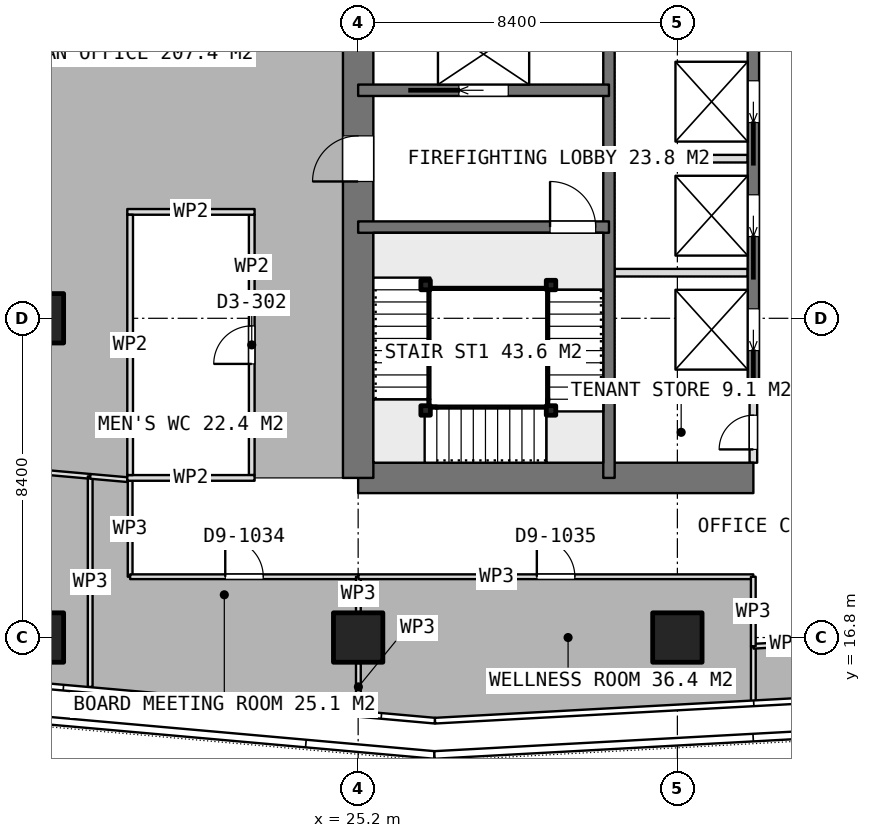
"""IFC4 building model, lengths in metres.
Left out: names, types, materials, properties, quantities, classifications, styles, units other than length and angle.
Written with IfcOpenShell. Run it as: python <this file> out.ifc"""

import sys

from ifc_helpers import new_model, si_unit, direction, frame, frame_2d, origin, origin_2d, place, context, subcontext, project, spatial, rectangle, extrude, element, fill, save


model = new_model("IFC4")
c1 = context("Model", 3, precision=1e-05, world=origin(), true_north=direction((0.0, 1.0)))
c2 = subcontext(c1, "Body", "Model", "MODEL_VIEW")
j1 = project(units=[si_unit("LENGTHUNIT", "METRE"), si_unit("PLANEANGLEUNIT", "RADIAN")], contexts=[c1])
p1 = place(None, origin())
s1 = spatial("IfcSite", under=j1, at=p1, CompositionType="ELEMENT")
p2 = place(p1, origin())
s2 = spatial("IfcBuilding", under=s1, at=p2, CompositionType="ELEMENT")
p3 = place(p2, frame((0.0, 0.0, 280.1)))
s3 = spatial("IfcBuildingStorey", under=s2, at=p3, CompositionType="ELEMENT", Elevation=280.1)
p4 = place(p3, frame((25.2, 21.0, 0.0), z_axis=(0.0, 0.0, 1.0), x_axis=(1.0, 0.0, 0.0)))
e1 = element("IfcWall", 1, at=p4, inside=s3, PredefinedType="SHEAR", context=c2, shape_type="SweptSolid", body=[
    extrude(rectangle(XDim=10.4, YDim=0.8, at=frame_2d((5.2, 0.0))), origin(), (0.0, 0.0, 1.0), 3.75),
])
p5 = place(p3, frame((25.2, 21.0, 0.0), z_axis=(0.0, 0.0, 1.0), x_axis=(0.0, 1.0, 0.0)))
e2 = element("IfcWall", 2, at=p5, inside=s3, PredefinedType="SHEAR", context=c2, shape_type="SweptSolid", body=[
    extrude(rectangle(XDim=25.2, YDim=0.8, at=frame_2d((12.6, 0.0))), origin(), (0.0, 0.0, 1.0), 3.75),
])
p6 = place(p5, frame((7.8, 0.0, 0.0)))
e3 = element("IfcOpeningElement", 3, at=p6, cuts=e2, PredefinedType="OPENING", context=c2, shape_type="SweptSolid", body=[
    extrude(rectangle(XDim=1.2, YDim=2.1, at=frame_2d((0.6, 1.05))), frame((0.0, 0.41, 0.0), z_axis=(0.0, -1.0, 0.0), x_axis=(1.0, 0.0, 0.0)), (0.0, 0.0, 1.0), 0.82),
])
p7 = place(p5, frame((14.25, 0.0, 0.0)))
e4 = element("IfcOpeningElement", 4, at=p7, cuts=e2, PredefinedType="OPENING", context=c2, shape_type="SweptSolid", body=[
    extrude(rectangle(XDim=0.9, YDim=2.1, at=frame_2d((0.45, 1.05))), frame((0.0, 0.41, 0.0), z_axis=(0.0, -1.0, 0.0), x_axis=(1.0, 0.0, 0.0)), (0.0, 0.0, 1.0), 0.82),
])
p8 = place(p5, frame((16.85, 0.0, 0.0)))
e5 = element("IfcOpeningElement", 5, at=p8, cuts=e2, PredefinedType="OPENING", context=c2, shape_type="SweptSolid", body=[
    extrude(rectangle(XDim=0.9, YDim=2.1, at=frame_2d((0.45, 1.05))), frame((0.0, 0.41, 0.0), z_axis=(0.0, -1.0, 0.0), x_axis=(1.0, 0.0, 0.0)), (0.0, 0.0, 1.0), 0.82),
])
p9 = place(p5, frame((18.95, 0.0, 0.0)))
e6 = element("IfcOpeningElement", 6, at=p9, cuts=e2, PredefinedType="OPENING", context=c2, shape_type="SweptSolid", body=[
    extrude(rectangle(XDim=1.2, YDim=2.1, at=frame_2d((0.6, 1.05))), frame((0.0, 0.41, 0.0), z_axis=(0.0, -1.0, 0.0), x_axis=(1.0, 0.0, 0.0)), (0.0, 0.0, 1.0), 0.82),
])
p10 = place(p3, frame((31.8, 21.0, 0.0), z_axis=(0.0, 0.0, 1.0), x_axis=(0.0, 1.0, 0.0)))
e7 = element("IfcWall", 7, at=p10, inside=s3, PredefinedType="SHEAR", context=c2, shape_type="SweptSolid", body=[
    extrude(rectangle(XDim=25.2, YDim=0.3, at=frame_2d((12.6, 0.0))), origin(), (0.0, 0.0, 1.0), 3.75),
])
p11 = place(p3, frame((35.6, 23.4, 0.0), z_axis=(0.0, 0.0, 1.0), x_axis=(0.0, 1.0, 0.0)))
e8 = element("IfcWall", 8, at=p11, inside=s3, PredefinedType="SHEAR", context=c2, shape_type="SweptSolid", body=[
    extrude(rectangle(XDim=18.0, YDim=0.3, at=frame_2d((9.0, 0.0))), origin(), (0.0, 0.0, 1.0), 3.75),
])
p12 = place(p11, frame((0.95, 0.0, 0.0)))
e9 = element("IfcOpeningElement", 9, at=p12, cuts=e8, PredefinedType="OPENING", context=c2, shape_type="SweptSolid", body=[
    extrude(rectangle(XDim=1.1, YDim=2.1, at=frame_2d((0.55, 1.05))), frame((0.0, 0.16, 0.0), z_axis=(0.0, -1.0, 0.0), x_axis=(1.0, 0.0, 0.0)), (0.0, 0.0, 1.0), 0.32),
])
p13 = place(p11, frame((3.95, 0.0, 0.0)))
e10 = element("IfcOpeningElement", 10, at=p13, cuts=e8, PredefinedType="OPENING", context=c2, shape_type="SweptSolid", body=[
    extrude(rectangle(XDim=1.1, YDim=2.1, at=frame_2d((0.55, 1.05))), frame((0.0, 0.16, 0.0), z_axis=(0.0, -1.0, 0.0), x_axis=(1.0, 0.0, 0.0)), (0.0, 0.0, 1.0), 0.32),
])
p14 = place(p11, frame((6.95, 0.0, 0.0)))
e11 = element("IfcOpeningElement", 11, at=p14, cuts=e8, PredefinedType="OPENING", context=c2, shape_type="SweptSolid", body=[
    extrude(rectangle(XDim=1.1, YDim=2.1, at=frame_2d((0.55, 1.05))), frame((0.0, 0.16, 0.0), z_axis=(0.0, -1.0, 0.0), x_axis=(1.0, 0.0, 0.0)), (0.0, 0.0, 1.0), 0.32),
])
p15 = place(p11, frame((9.95, 0.0, 0.0)))
e12 = element("IfcOpeningElement", 12, at=p15, cuts=e8, PredefinedType="OPENING", context=c2, shape_type="SweptSolid", body=[
    extrude(rectangle(XDim=1.1, YDim=2.1, at=frame_2d((0.55, 1.05))), frame((0.0, 0.16, 0.0), z_axis=(0.0, -1.0, 0.0), x_axis=(1.0, 0.0, 0.0)), (0.0, 0.0, 1.0), 0.32),
])
p16 = place(p11, frame((12.95, 0.0, 0.0)))
e13 = element("IfcOpeningElement", 13, at=p16, cuts=e8, PredefinedType="OPENING", context=c2, shape_type="SweptSolid", body=[
    extrude(rectangle(XDim=1.1, YDim=2.1, at=frame_2d((0.55, 1.05))), frame((0.0, 0.16, 0.0), z_axis=(0.0, -1.0, 0.0), x_axis=(1.0, 0.0, 0.0)), (0.0, 0.0, 1.0), 0.32),
])
p17 = place(p11, frame((15.95, 0.0, 0.0)))
e14 = element("IfcOpeningElement", 14, at=p17, cuts=e8, PredefinedType="OPENING", context=c2, shape_type="SweptSolid", body=[
    extrude(rectangle(XDim=1.1, YDim=2.1, at=frame_2d((0.55, 1.05))), frame((0.0, 0.16, 0.0), z_axis=(0.0, -1.0, 0.0), x_axis=(1.0, 0.0, 0.0)), (0.0, 0.0, 1.0), 0.32),
])
p18 = place(p3, frame((31.8, 23.4, 0.0), z_axis=(0.0, 0.0, 1.0), x_axis=(1.0, 0.0, 0.0)))
e15 = element("IfcWall", 15, at=p18, inside=s3, PredefinedType="SHEAR", context=c2, shape_type="SweptSolid", body=[
    extrude(rectangle(XDim=3.8, YDim=0.3, at=frame_2d((1.9, 0.0))), origin(), (0.0, 0.0, 1.0), 3.75),
])
p19 = place(p3, frame((25.2, 27.6, 0.0), z_axis=(0.0, 0.0, 1.0), x_axis=(1.0, 0.0, 0.0)))
e16 = element("IfcWall", 16, at=p19, inside=s3, PredefinedType="SHEAR", context=c2, shape_type="SweptSolid", body=[
    extrude(rectangle(XDim=6.6, YDim=0.3, at=frame_2d((3.3, 0.0))), origin(), (0.0, 0.0, 1.0), 3.75),
])
p20 = place(p19, frame((5.05, 0.0, 0.0)))
e17 = element("IfcOpeningElement", 17, at=p20, cuts=e16, PredefinedType="OPENING", context=c2, shape_type="SweptSolid", body=[
    extrude(rectangle(XDim=1.2, YDim=2.1, at=frame_2d((0.6, 1.05))), frame((0.0, 0.16, 0.0), z_axis=(0.0, -1.0, 0.0), x_axis=(1.0, 0.0, 0.0)), (0.0, 0.0, 1.0), 0.32),
])
p21 = place(p3, frame((25.2, 31.2, 0.0), z_axis=(0.0, 0.0, 1.0), x_axis=(1.0, 0.0, 0.0)))
e18 = element("IfcWall", 18, at=p21, inside=s3, PredefinedType="SHEAR", context=c2, shape_type="SweptSolid", body=[
    extrude(rectangle(XDim=6.6, YDim=0.3, at=frame_2d((3.3, 0.0))), origin(), (0.0, 0.0, 1.0), 3.75),
])
p22 = place(p21, frame((2.65, 0.0, 0.0)))
e19 = element("IfcOpeningElement", 19, at=p22, cuts=e18, PredefinedType="OPENING", context=c2, shape_type="SweptSolid", body=[
    extrude(rectangle(XDim=1.3, YDim=2.1, at=frame_2d((0.65, 1.05))), frame((0.0, 0.16, 0.0), z_axis=(0.0, -1.0, 0.0), x_axis=(1.0, 0.0, 0.0)), (0.0, 0.0, 1.0), 0.32),
])
for number, where, z_axis, x_axis in (
    (20, (16.8, 16.8, 0.0), (0.0, 0.0, 1.0), (1.0, 0.0, 0.0)),
    (21, (16.8, 25.2, 0.0), (0.0, 0.0, 1.0), (1.0, 0.0, 0.0)),
    (22, (25.2, 16.8, 0.0), (0.0, 0.0, 1.0), (1.0, 0.0, 0.0)),
    (23, (33.6, 16.8, 0.0), (0.0, 0.0, 1.0), (1.0, 0.0, 0.0)),
):
    element("IfcColumn", number, at=place(p3, frame(where, z_axis=z_axis, x_axis=x_axis)), inside=s3, PredefinedType="COLUMN", context=c2, shape_type="SweptSolid", body=[
        extrude(rectangle(XDim=1.3, YDim=1.3, at=origin_2d()), origin(), (0.0, 0.0, 1.0), 3.75),
    ])
for number, where, z_axis, x_axis in (
    (24, (31.95, 26.4, 0.0), (0.0, 0.0, 1.0), (1.0, 0.0, 0.0)),
    (25, (31.95, 29.4, 0.0), (0.0, 0.0, 1.0), (1.0, 0.0, 0.0)),
):
    element("IfcWall", number, at=place(p3, frame(where, z_axis=z_axis, x_axis=x_axis)), inside=s3, PredefinedType="PARTITIONING", context=c2, shape_type="SweptSolid", body=[
        extrude(rectangle(XDim=3.5, YDim=0.2, at=frame_2d((1.75, 0.0))), origin(), (0.0, 0.0, 1.0), 3.5),
    ])
p23 = place(p3, frame((35.6, 21.4, 0.0), z_axis=(0.0, 0.0, 1.0), x_axis=(0.0, 1.0, 0.0)))
e26 = element("IfcWall", 26, at=p23, inside=s3, PredefinedType="PARTITIONING", context=c2, shape_type="SweptSolid", body=[
    extrude(rectangle(XDim=1.85, YDim=0.2, at=frame_2d((0.925, 0.0))), origin(), (0.0, 0.0, 1.0), 3.5),
])
p24 = place(p23, frame((0.35, 0.0, 0.0)))
e27 = element("IfcOpeningElement", 27, at=p24, cuts=e26, PredefinedType="OPENING", context=c2, shape_type="SweptSolid", body=[
    extrude(rectangle(XDim=0.9, YDim=2.1, at=frame_2d((0.45, 1.05))), frame((0.0, 0.11, 0.0), z_axis=(0.0, -1.0, 0.0), x_axis=(1.0, 0.0, 0.0)), (0.0, 0.0, 1.0), 0.22),
])
for number, where, z_axis, x_axis in (
    (28, (19.125, 21.0, 0.0), (0.0, 0.0, 1.0), (1.0, 0.0, 0.0)),
    (29, (19.125, 28.0, 0.0), (0.0, 0.0, 1.0), (1.0, 0.0, 0.0)),
):
    element("IfcWall", number, at=place(p3, frame(where, z_axis=z_axis, x_axis=x_axis)), inside=s3, PredefinedType="PARTITIONING", context=c2, shape_type="SweptSolid", body=[
        extrude(rectangle(XDim=3.35, YDim=0.15, at=frame_2d((1.675, 0.0))), origin(), (0.0, 0.0, 1.0), 3.5),
    ])
p25 = place(p3, frame((19.2, 21.075, 0.0), z_axis=(0.0, 0.0, 1.0), x_axis=(0.0, 1.0, 0.0)))
e30 = element("IfcWall", 30, at=p25, inside=s3, PredefinedType="PARTITIONING", context=c2, shape_type="SweptSolid", body=[
    extrude(rectangle(XDim=6.85, YDim=0.15, at=frame_2d((3.425, 0.0))), origin(), (0.0, 0.0, 1.0), 3.5),
])
p26 = place(p3, frame((22.4, 21.075, 0.0), z_axis=(0.0, 0.0, 1.0), x_axis=(0.0, 1.0, 0.0)))
e31 = element("IfcWall", 31, at=p26, inside=s3, PredefinedType="PARTITIONING", context=c2, shape_type="SweptSolid", body=[
    extrude(rectangle(XDim=6.85, YDim=0.15, at=frame_2d((3.425, 0.0))), origin(), (0.0, 0.0, 1.0), 3.5),
])
p27 = place(p26, frame((2.925, 0.0, 0.0)))
e32 = element("IfcOpeningElement", 32, at=p27, cuts=e31, PredefinedType="OPENING", context=c2, shape_type="SweptSolid", body=[
    extrude(rectangle(XDim=1.0, YDim=2.1, at=frame_2d((0.5, 1.05))), frame((0.0, 0.085, 0.0), z_axis=(0.0, -1.0, 0.0), x_axis=(1.0, 0.0, 0.0)), (0.0, 0.0, 1.0), 0.17),
])
p28 = place(p3, frame((35.599, 15.119, 0.0), z_axis=(0.0, 0.0, 1.0), x_axis=(0.0, 1.0, 0.0)))
e33 = element("IfcWall", 33, at=p28, inside=s3, PredefinedType="PARTITIONING", context=c2, shape_type="SweptSolid", body=[
    extrude(rectangle(XDim=1.452, YDim=0.125, at=frame_2d((0.726, 0.0))), origin(), (0.0, 0.0, 1.0), 3.5),
])
p29 = place(p3, frame((35.599, 16.571, 0.0), z_axis=(0.0, 0.0, 1.0), x_axis=(0.998516419886, 0.054451439074, 0.0)))
e34 = element("IfcWall", 34, at=p29, inside=s3, PredefinedType="PARTITIONING", context=c2, shape_type="SweptSolid", body=[
    extrude(rectangle(XDim=4.407, YDim=0.125, at=frame_2d((2.204, 0.0))), origin(), (0.0, 0.0, 1.0), 3.5),
])
p30 = place(p29, frame((1.704, 0.0, 0.0)))
e35 = element("IfcOpeningElement", 35, at=p30, cuts=e34, PredefinedType="OPENING", context=c2, shape_type="SweptSolid", body=[
    extrude(rectangle(XDim=1.0, YDim=2.1, at=frame_2d((0.5, 1.05))), frame((0.0, 0.073, 0.0), z_axis=(0.0, -1.0, 0.0), x_axis=(1.0, 0.0, 0.0)), (0.0, 0.0, 1.0), 0.145),
])
p31 = place(p3, frame((12.787, 21.518, 0.0), z_axis=(0.0, 0.0, 1.0), x_axis=(0.996065348673, -0.088621787237, 0.0)))
e36 = element("IfcWall", 36, at=p31, inside=s3, PredefinedType="PARTITIONING", context=c2, shape_type="SweptSolid", body=[
    extrude(rectangle(XDim=5.383, YDim=0.125, at=frame_2d((2.691, 0.0))), origin(), (0.0, 0.0, 1.0), 3.5),
])
p32 = place(p3, frame((18.149, 21.041, 0.0), z_axis=(0.0, 0.0, 1.0), x_axis=(0.0, -1.0, 0.0)))
e37 = element("IfcWall", 37, at=p32, inside=s3, PredefinedType="PARTITIONING", context=c2, shape_type="SweptSolid", body=[
    extrude(rectangle(XDim=5.541, YDim=0.125, at=frame_2d((2.771, 0.0))), origin(), (0.0, 0.0, 1.0), 3.5),
])
p33 = place(p3, frame((18.15, 21.041, 0.0), z_axis=(0.0, 0.0, 1.0), x_axis=(0.996138836376, -0.087791905459, 0.0)))
e38 = element("IfcWall", 38, at=p33, inside=s3, PredefinedType="PARTITIONING", context=c2, shape_type="SweptSolid", body=[
    extrude(rectangle(XDim=0.979, YDim=0.125, at=frame_2d((0.489, 0.0))), origin(), (0.0, 0.0, 1.0), 3.5),
])
p34 = place(p3, frame((19.2, 20.925, 0.0), z_axis=(0.0, 0.0, 1.0), x_axis=(0.0, -1.0, 0.0)))
e39 = element("IfcWall", 39, at=p34, inside=s3, PredefinedType="PARTITIONING", context=c2, shape_type="SweptSolid", body=[
    extrude(rectangle(XDim=2.525, YDim=0.125, at=frame_2d((1.263, 0.0))), origin(), (0.0, 0.0, 1.0), 3.5),
])
p35 = place(p3, frame((19.2, 18.4, 0.0), z_axis=(0.0, 0.0, 1.0), x_axis=(1.0, 0.0, 0.0)))
e40 = element("IfcWall", 40, at=p35, inside=s3, PredefinedType="PARTITIONING", context=c2, shape_type="SweptSolid", body=[
    extrude(rectangle(XDim=6.006, YDim=0.125, at=frame_2d((3.003, 0.0))), origin(), (0.0, 0.0, 1.0), 3.5),
])
p36 = place(p35, frame((2.503, 0.0, 0.0)))
e41 = element("IfcOpeningElement", 41, at=p36, cuts=e40, PredefinedType="OPENING", context=c2, shape_type="SweptSolid", body=[
    extrude(rectangle(XDim=1.0, YDim=2.1, at=frame_2d((0.5, 1.05))), frame((0.0, 0.073, 0.0), z_axis=(0.0, -1.0, 0.0), x_axis=(1.0, 0.0, 0.0)), (0.0, 0.0, 1.0), 0.145),
])
p37 = place(p3, frame((25.206, 18.4, 0.0), z_axis=(0.0, 0.0, 1.0), x_axis=(0.0, -1.0, 0.0)))
e42 = element("IfcWall", 42, at=p37, inside=s3, PredefinedType="PARTITIONING", context=c2, shape_type="SweptSolid", body=[
    extrude(rectangle(XDim=0.93, YDim=0.125, at=frame_2d((0.465, 0.0))), origin(), (0.0, 0.0, 1.0), 3.5),
])
p38 = place(p3, frame((25.206, 16.13, 0.0), z_axis=(0.0, 0.0, 1.0), x_axis=(0.0, -1.0, 0.0)))
e43 = element("IfcWall", 43, at=p38, inside=s3, PredefinedType="PARTITIONING", context=c2, shape_type="SweptSolid", body=[
    extrude(rectangle(XDim=1.258, YDim=0.125, at=frame_2d((0.629, 0.0))), origin(), (0.0, 0.0, 1.0), 3.5),
])
p39 = place(p3, frame((25.207, 18.4, 0.0), z_axis=(0.0, 0.0, 1.0), x_axis=(1.0, 0.0, 0.0)))
e44 = element("IfcWall", 44, at=p39, inside=s3, PredefinedType="PARTITIONING", context=c2, shape_type="SweptSolid", body=[
    extrude(rectangle(XDim=10.391, YDim=0.125, at=frame_2d((5.195, 0.0))), origin(), (0.0, 0.0, 1.0), 3.5),
])
p40 = place(p39, frame((4.695, 0.0, 0.0)))
e45 = element("IfcOpeningElement", 45, at=p40, cuts=e44, PredefinedType="OPENING", context=c2, shape_type="SweptSolid", body=[
    extrude(rectangle(XDim=1.0, YDim=2.1, at=frame_2d((0.5, 1.05))), frame((0.0, 0.073, 0.0), z_axis=(0.0, -1.0, 0.0), x_axis=(1.0, 0.0, 0.0)), (0.0, 0.0, 1.0), 0.145),
])
p41 = place(p3, frame((35.598, 18.4, 0.0), z_axis=(0.0, 0.0, 1.0), x_axis=(0.0, -1.0, 0.0)))
e46 = element("IfcWall", 46, at=p41, inside=s3, PredefinedType="PARTITIONING", context=c2, shape_type="SweptSolid", body=[
    extrude(rectangle(XDim=1.829, YDim=0.125, at=frame_2d((0.915, 0.0))), origin(), (0.0, 0.0, 1.0), 3.5),
])
for number, where, z_axis, x_axis in (
    (47, (30.275, 26.075, 0.0), (0.0, 0.0, 1.0), (1.0, 0.0, 0.0)),
    (48, (30.275, 22.775, 0.0), (0.0, 0.0, 1.0), (1.0, 0.0, 0.0)),
    (49, (26.975, 22.775, 0.0), (0.0, 0.0, 1.0), (1.0, 0.0, 0.0)),
    (50, (26.975, 26.075, 0.0), (0.0, 0.0, 1.0), (1.0, 0.0, 0.0)),
):
    element("IfcColumn", number, at=place(p3, frame(where, z_axis=z_axis, x_axis=x_axis)), inside=s3, PredefinedType="COLUMN", context=c2, shape_type="SweptSolid", body=[
        extrude(rectangle(XDim=0.25, YDim=0.25, at=origin_2d()), origin(), (0.0, 0.0, 1.0), 3.75),
    ])
p42 = place(p6, origin())
e51 = element("IfcDoor", 51, at=p42, inside=s3, OperationType="SINGLE_SWING_LEFT", PredefinedType="DOOR", context=c2, shape_type="SweptSolid", body=[
    extrude(rectangle(XDim=1.2, YDim=2.1, at=frame_2d((0.6, 1.05))), frame((0.0, 0.025, 0.0), z_axis=(0.0, -1.0, 0.0), x_axis=(1.0, 0.0, 0.0)), (0.0, 0.0, 1.0), 0.05),
])
fill(e3, e51)
p43 = place(p24, origin())
e52 = element("IfcDoor", 52, at=p43, inside=s3, OperationType="SINGLE_SWING_LEFT", PredefinedType="DOOR", context=c2, shape_type="SweptSolid", body=[
    extrude(rectangle(XDim=0.9, YDim=2.1, at=frame_2d((0.45, 1.05))), frame((0.0, 0.025, 0.0), z_axis=(0.0, -1.0, 0.0), x_axis=(1.0, 0.0, 0.0)), (0.0, 0.0, 1.0), 0.05),
])
fill(e27, e52)
p44 = place(p12, origin())
e53 = element("IfcDoor", 53, at=p44, inside=s3, OperationType="SLIDING_TO_LEFT", PredefinedType="USERDEFINED", context=c2, shape_type="SweptSolid", body=[
    extrude(rectangle(XDim=1.1, YDim=2.1, at=frame_2d((0.55, 1.05))), frame((0.0, 0.025, 0.0), z_axis=(0.0, -1.0, 0.0), x_axis=(1.0, 0.0, 0.0)), (0.0, 0.0, 1.0), 0.05),
])
fill(e9, e53)
p45 = place(p13, origin())
e54 = element("IfcDoor", 54, at=p45, inside=s3, OperationType="SLIDING_TO_LEFT", PredefinedType="USERDEFINED", context=c2, shape_type="SweptSolid", body=[
    extrude(rectangle(XDim=1.1, YDim=2.1, at=frame_2d((0.55, 1.05))), frame((0.0, 0.025, 0.0), z_axis=(0.0, -1.0, 0.0), x_axis=(1.0, 0.0, 0.0)), (0.0, 0.0, 1.0), 0.05),
])
fill(e10, e54)
p46 = place(p14, origin())
e55 = element("IfcDoor", 55, at=p46, inside=s3, OperationType="SLIDING_TO_LEFT", PredefinedType="USERDEFINED", context=c2, shape_type="SweptSolid", body=[
    extrude(rectangle(XDim=1.1, YDim=2.1, at=frame_2d((0.55, 1.05))), frame((0.0, 0.025, 0.0), z_axis=(0.0, -1.0, 0.0), x_axis=(1.0, 0.0, 0.0)), (0.0, 0.0, 1.0), 0.05),
])
fill(e11, e55)
p47 = place(p22, origin())
e56 = element("IfcDoor", 56, at=p47, inside=s3, OperationType="SLIDING_TO_LEFT", PredefinedType="USERDEFINED", context=c2, shape_type="SweptSolid", body=[
    extrude(rectangle(XDim=1.3, YDim=2.1, at=frame_2d((0.65, 1.05))), frame((0.0, 0.025, 0.0), z_axis=(0.0, -1.0, 0.0), x_axis=(1.0, 0.0, 0.0)), (0.0, 0.0, 1.0), 0.05),
])
fill(e19, e56)
p48 = place(p27, origin())
e57 = element("IfcDoor", 57, at=p48, inside=s3, OperationType="SINGLE_SWING_LEFT", PredefinedType="DOOR", context=c2, shape_type="SweptSolid", body=[
    extrude(rectangle(XDim=1.0, YDim=2.1, at=frame_2d((0.5, 1.05))), frame((0.0, 0.025, 0.0), z_axis=(0.0, -1.0, 0.0), x_axis=(1.0, 0.0, 0.0)), (0.0, 0.0, 1.0), 0.05),
])
fill(e32, e57)
p49 = place(p36, origin())
e58 = element("IfcDoor", 58, at=p49, inside=s3, OperationType="SINGLE_SWING_LEFT", PredefinedType="DOOR", context=c2, shape_type="SweptSolid", body=[
    extrude(rectangle(XDim=1.0, YDim=2.1, at=frame_2d((0.5, 1.05))), frame((0.0, 0.025, 0.0), z_axis=(0.0, -1.0, 0.0), x_axis=(1.0, 0.0, 0.0)), (0.0, 0.0, 1.0), 0.05),
])
fill(e41, e58)
p50 = place(p40, origin())
e59 = element("IfcDoor", 59, at=p50, inside=s3, OperationType="SINGLE_SWING_LEFT", PredefinedType="DOOR", context=c2, shape_type="SweptSolid", body=[
    extrude(rectangle(XDim=1.0, YDim=2.1, at=frame_2d((0.5, 1.05))), frame((0.0, 0.025, 0.0), z_axis=(0.0, -1.0, 0.0), x_axis=(1.0, 0.0, 0.0)), (0.0, 0.0, 1.0), 0.05),
])
fill(e45, e59)
p51 = place(p20, origin())
e60 = element("IfcDoor", 60, at=p51, inside=s3, OperationType="SINGLE_SWING_RIGHT", PredefinedType="DOOR", context=c2, shape_type="SweptSolid", body=[
    extrude(rectangle(XDim=1.2, YDim=2.1, at=frame_2d((0.6, 1.05))), frame((0.0, 0.025, 0.0), z_axis=(0.0, -1.0, 0.0), x_axis=(1.0, 0.0, 0.0)), (0.0, 0.0, 1.0), 0.05),
])
fill(e17, e60)
save(model, sys.argv[1])
